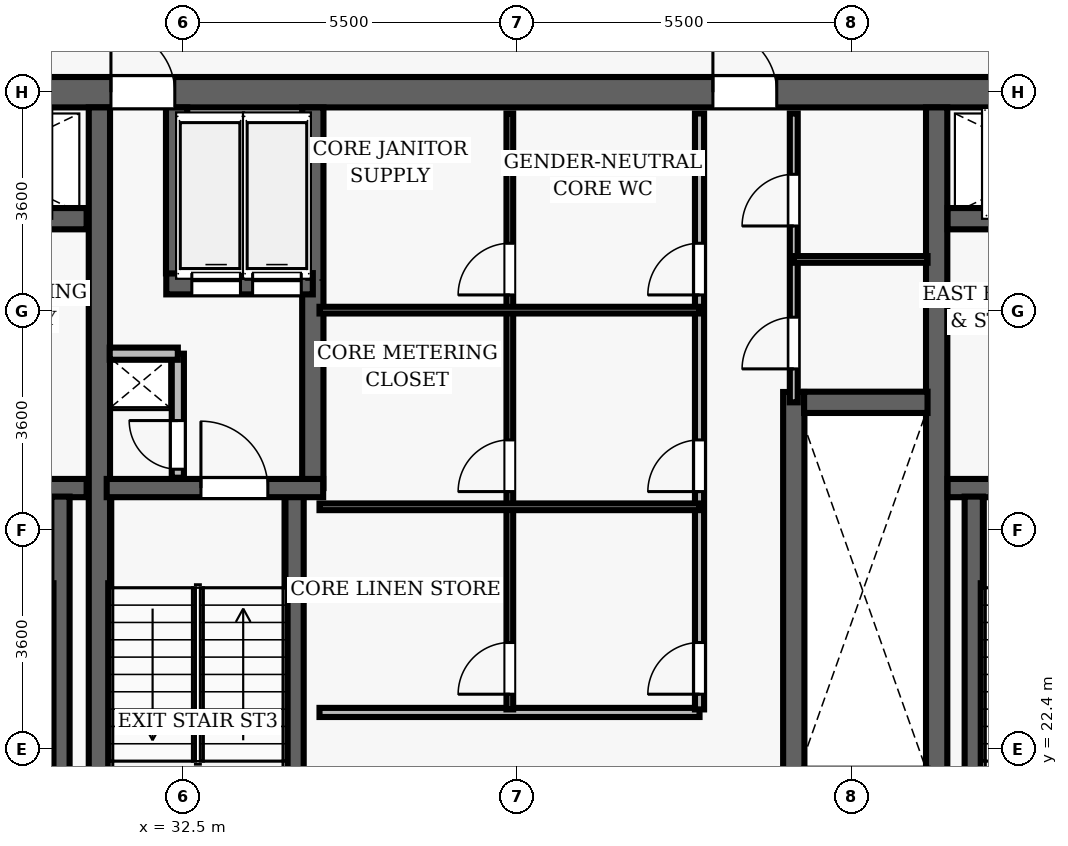
"""IFC4 building model, lengths in metres.
Left out: names, types, materials, properties, quantities, classifications, styles, units other than length and angle.
Written with IfcOpenShell. Run it as: python <this file> out.ifc"""

import sys

from ifc_helpers import new_model, si_unit, direction, frame, frame_2d, origin, place, context, subcontext, project, spatial, rectangle, extrude, element, fill, save


model = new_model("IFC4")
c1 = context("Model", 3, precision=1e-05, world=origin(), true_north=direction((0.0, 1.0)))
c2 = subcontext(c1, "Body", "Model", "MODEL_VIEW")
j1 = project(units=[si_unit("LENGTHUNIT", "METRE"), si_unit("PLANEANGLEUNIT", "RADIAN")], contexts=[c1])
p1 = place(None, origin())
s1 = spatial("IfcSite", under=j1, at=p1, CompositionType="ELEMENT")
p2 = place(p1, origin())
s2 = spatial("IfcBuilding", under=s1, at=p2, CompositionType="ELEMENT")
p3 = place(p2, frame((0.0, 0.0, 202.0)))
s3 = spatial("IfcBuildingStorey", under=s2, at=p3, CompositionType="ELEMENT", Elevation=202.0)
p4 = place(p3, frame((26.75, 33.2, 0.0), z_axis=(0.0, 0.0, 1.0), x_axis=(1.0, 0.0, 0.0)))
e1 = element("IfcWall", 1, at=p4, inside=s3, PredefinedType="SHEAR", context=c2, shape_type="SweptSolid", body=[
    extrude(rectangle(XDim=22.5, YDim=0.5, at=frame_2d((11.25, 0.0))), origin(), (0.0, 0.0, 1.0), 3.85),
])
p5 = place(p4, frame((4.57, 0.0, 0.0)))
e2 = element("IfcOpeningElement", 2, at=p5, cuts=e1, PredefinedType="OPENING", context=c2, shape_type="SweptSolid", body=[
    extrude(rectangle(XDim=1.05, YDim=2.15, at=frame_2d((0.525, 1.075))), frame((0.0, 0.26, 0.0), z_axis=(0.0, -1.0, 0.0), x_axis=(1.0, 0.0, 0.0)), (0.0, 0.0, 1.0), 0.52),
])
p6 = place(p4, frame((14.47, 0.0, 0.0)))
e3 = element("IfcOpeningElement", 3, at=p6, cuts=e1, PredefinedType="OPENING", context=c2, shape_type="SweptSolid", body=[
    extrude(rectangle(XDim=1.05, YDim=2.15, at=frame_2d((0.525, 1.075))), frame((0.0, 0.26, 0.0), z_axis=(0.0, -1.0, 0.0), x_axis=(1.0, 0.0, 0.0)), (0.0, 0.0, 1.0), 0.52),
])
for number, where, z_axis, x_axis in (
    (4, (31.13, 19.05, 0.0), (0.0, 0.0, 1.0), (0.0, 1.0, 0.0)),
    (5, (44.9, 19.05, 0.0), (0.0, 0.0, 1.0), (0.0, 1.0, 0.0)),
):
    element("IfcWall", number, at=place(p3, frame(where, z_axis=z_axis, x_axis=x_axis)), inside=s3, PredefinedType="SHEAR", context=c2, shape_type="SweptSolid", body=[
        extrude(rectangle(XDim=13.9, YDim=0.35, at=frame_2d((6.95, 0.0))), origin(), (0.0, 0.0, 1.0), 3.85),
    ])
p7 = place(p3, frame((27.25, 26.69, 0.0), z_axis=(0.0, 0.0, 1.0), x_axis=(1.0, 0.0, 0.0)))
e6 = element("IfcWall", 6, at=p7, inside=s3, PredefinedType="SHEAR", context=c2, shape_type="SweptSolid", body=[
    extrude(rectangle(XDim=3.67, YDim=0.3, at=frame_2d((1.835, 0.0))), origin(), (0.0, 0.0, 1.0), 3.85),
])
p8 = place(p7, frame((1.05, 0.0, 0.0)))
e7 = element("IfcOpeningElement", 7, at=p8, cuts=e6, PredefinedType="OPENING", context=c2, shape_type="SweptSolid", body=[
    extrude(rectangle(XDim=1.1, YDim=2.15, at=frame_2d((0.55, 1.075))), frame((0.0, 0.16, 0.0), z_axis=(0.0, -1.0, 0.0), x_axis=(1.0, 0.0, 0.0)), (0.0, 0.0, 1.0), 0.32),
])
p9 = place(p3, frame((30.49, 19.05, 0.0), z_axis=(0.0, 0.0, 1.0), x_axis=(0.0, 1.0, 0.0)))
e8 = element("IfcWall", 8, at=p9, inside=s3, PredefinedType="SHEAR", context=c2, shape_type="SweptSolid", body=[
    extrude(rectangle(XDim=7.5, YDim=0.3, at=frame_2d((3.75, 0.0))), origin(), (0.0, 0.0, 1.0), 3.85),
])
p10 = place(p3, frame((27.25, 31.12, 0.0), z_axis=(0.0, 0.0, 1.0), x_axis=(1.0, 0.0, 0.0)))
e9 = element("IfcWall", 9, at=p10, inside=s3, PredefinedType="SHEAR", context=c2, shape_type="SweptSolid", body=[
    extrude(rectangle(XDim=3.67, YDim=0.35, at=frame_2d((1.835, 0.0))), origin(), (0.0, 0.0, 1.0), 3.035),
])
p11 = place(p10, frame((1.25, 0.0, 0.0)))
e10 = element("IfcOpeningElement", 10, at=p11, cuts=e9, PredefinedType="OPENING", context=c2, shape_type="SweptSolid", body=[
    extrude(rectangle(XDim=1.1, YDim=2.15, at=frame_2d((0.55, 1.075))), frame((0.0, 0.185, 0.0), z_axis=(0.0, -1.0, 0.0), x_axis=(1.0, 0.0, 0.0)), (0.0, 0.0, 1.0), 0.37),
])
p12 = place(p3, frame((45.08, 26.69, 0.0), z_axis=(0.0, 0.0, 1.0), x_axis=(1.0, 0.0, 0.0)))
e11 = element("IfcWall", 11, at=p12, inside=s3, PredefinedType="SHEAR", context=c2, shape_type="SweptSolid", body=[
    extrude(rectangle(XDim=3.67, YDim=0.3, at=frame_2d((1.835, 0.0))), origin(), (0.0, 0.0, 1.0), 3.85),
])
p13 = place(p12, frame((1.05, 0.0, 0.0)))
e12 = element("IfcOpeningElement", 12, at=p13, cuts=e11, PredefinedType="OPENING", context=c2, shape_type="SweptSolid", body=[
    extrude(rectangle(XDim=1.1, YDim=2.15, at=frame_2d((0.55, 1.075))), frame((0.0, 0.16, 0.0), z_axis=(0.0, -1.0, 0.0), x_axis=(1.0, 0.0, 0.0)), (0.0, 0.0, 1.0), 0.32),
])
p14 = place(p3, frame((45.51, 19.05, 0.0), z_axis=(0.0, 0.0, 1.0), x_axis=(0.0, 1.0, 0.0)))
e13 = element("IfcWall", 13, at=p14, inside=s3, PredefinedType="SHEAR", context=c2, shape_type="SweptSolid", body=[
    extrude(rectangle(XDim=7.5, YDim=0.3, at=frame_2d((3.75, 0.0))), origin(), (0.0, 0.0, 1.0), 3.85),
])
p15 = place(p3, frame((45.08, 31.12, 0.0), z_axis=(0.0, 0.0, 1.0), x_axis=(1.0, 0.0, 0.0)))
e14 = element("IfcWall", 14, at=p15, inside=s3, PredefinedType="SHEAR", context=c2, shape_type="SweptSolid", body=[
    extrude(rectangle(XDim=3.67, YDim=0.35, at=frame_2d((1.835, 0.0))), origin(), (0.0, 0.0, 1.0), 3.035),
])
p16 = place(p15, frame((1.25, 0.0, 0.0)))
e15 = element("IfcOpeningElement", 15, at=p16, cuts=e14, PredefinedType="OPENING", context=c2, shape_type="SweptSolid", body=[
    extrude(rectangle(XDim=1.1, YDim=2.15, at=frame_2d((0.55, 1.075))), frame((0.0, 0.185, 0.0), z_axis=(0.0, -1.0, 0.0), x_axis=(1.0, 0.0, 0.0)), (0.0, 0.0, 1.0), 0.37),
])
p17 = place(p3, frame((34.34, 19.05, 0.0), z_axis=(0.0, 0.0, 1.0), x_axis=(0.0, 1.0, 0.0)))
e16 = element("IfcWall", 16, at=p17, inside=s3, PredefinedType="SHEAR", context=c2, shape_type="SweptSolid", body=[
    extrude(rectangle(XDim=7.5, YDim=0.3, at=frame_2d((3.75, 0.0))), origin(), (0.0, 0.0, 1.0), 3.85),
])
p18 = place(p3, frame((34.64, 26.69, 0.0), z_axis=(0.0, 0.0, 1.0), x_axis=(0.0, 1.0, 0.0)))
e17 = element("IfcWall", 17, at=p18, inside=s3, PredefinedType="SHEAR", context=c2, shape_type="SweptSolid", body=[
    extrude(rectangle(XDim=6.26, YDim=0.35, at=frame_2d((3.13, 0.0))), origin(), (0.0, 0.0, 1.0), 3.85),
])
p19 = place(p3, frame((31.25, 26.69, 0.0), z_axis=(0.0, 0.0, 1.0), x_axis=(1.0, 0.0, 0.0)))
e18 = element("IfcWall", 18, at=p19, inside=s3, PredefinedType="SHEAR", context=c2, shape_type="SweptSolid", body=[
    extrude(rectangle(XDim=3.56, YDim=0.3, at=frame_2d((1.78, 0.0))), origin(), (0.0, 0.0, 1.0), 3.85),
])
p20 = place(p19, frame((1.55, 0.0, 0.0)))
e19 = element("IfcOpeningElement", 19, at=p20, cuts=e18, PredefinedType="OPENING", context=c2, shape_type="SweptSolid", body=[
    extrude(rectangle(XDim=1.1, YDim=2.15, at=frame_2d((0.55, 1.075))), frame((0.0, 0.16, 0.0), z_axis=(0.0, -1.0, 0.0), x_axis=(1.0, 0.0, 0.0)), (0.0, 0.0, 1.0), 0.32),
])
p21 = place(p3, frame((32.23, 30.05, 0.0), z_axis=(0.0, 0.0, 1.0), x_axis=(1.0, 0.0, 0.0)))
e20 = element("IfcWall", 20, at=p21, inside=s3, PredefinedType="SHEAR", context=c2, shape_type="SweptSolid", body=[
    extrude(rectangle(XDim=2.41, YDim=0.35, at=frame_2d((1.205, 0.0))), origin(), (0.0, 0.0, 1.0), 3.035),
])
p22 = place(p21, frame((0.42, 0.0, 0.0)))
e21 = element("IfcOpeningElement", 21, at=p22, cuts=e20, PredefinedType="OPENING", context=c2, shape_type="SweptSolid", body=[
    extrude(rectangle(XDim=0.8, YDim=2.15, at=frame_2d((0.4, 1.075))), frame((0.0, 0.185, 0.0), z_axis=(0.0, -1.0, 0.0), x_axis=(1.0, 0.0, 0.0)), (0.0, 0.0, 1.0), 0.37),
])
p23 = place(p21, frame((1.42, 0.0, 0.0)))
e22 = element("IfcOpeningElement", 22, at=p23, cuts=e20, PredefinedType="OPENING", context=c2, shape_type="SweptSolid", body=[
    extrude(rectangle(XDim=0.8, YDim=2.15, at=frame_2d((0.4, 1.075))), frame((0.0, 0.185, 0.0), z_axis=(0.0, -1.0, 0.0), x_axis=(1.0, 0.0, 0.0)), (0.0, 0.0, 1.0), 0.37),
])
p24 = place(p3, frame((32.4, 30.22, 0.0), z_axis=(0.0, 0.0, 1.0), x_axis=(0.0, 1.0, 0.0)))
e23 = element("IfcWall", 23, at=p24, inside=s3, PredefinedType="SHEAR", context=c2, shape_type="SweptSolid", body=[
    extrude(rectangle(XDim=2.73, YDim=0.35, at=frame_2d((1.365, 0.0))), origin(), (0.0, 0.0, 1.0), 3.035),
])
p25 = place(p3, frame((32.42, 26.86, 0.0), z_axis=(0.0, 0.0, 1.0), x_axis=(0.0, 1.0, 0.0)))
e24 = element("IfcWall", 24, at=p25, inside=s3, PredefinedType="PARTITIONING", context=c2, shape_type="SweptSolid", body=[
    extrude(rectangle(XDim=2.04, YDim=0.2, at=frame_2d((1.02, 0.0))), origin(), (0.0, 0.0, 1.0), 3.035),
])
p26 = place(p25, frame((0.14, 0.0, 0.0)))
e25 = element("IfcOpeningElement", 25, at=p26, cuts=e24, PredefinedType="OPENING", context=c2, shape_type="SweptSolid", body=[
    extrude(rectangle(XDim=0.8, YDim=2.05, at=frame_2d((0.4, 1.025))), frame((0.0, 0.11, 0.0), z_axis=(0.0, -1.0, 0.0), x_axis=(1.0, 0.0, 0.0)), (0.0, 0.0, 1.0), 0.22),
])
p27 = place(p3, frame((31.3, 28.9, 0.0), z_axis=(0.0, 0.0, 1.0), x_axis=(1.0, 0.0, 0.0)))
e26 = element("IfcWall", 26, at=p27, inside=s3, PredefinedType="PARTITIONING", context=c2, shape_type="SweptSolid", body=[
    extrude(rectangle(XDim=1.12, YDim=0.2, at=frame_2d((0.56, 0.0))), origin(), (0.0, 0.0, 1.0), 3.035),
])
p28 = place(p3, frame((42.55, 21.73, 0.0), z_axis=(0.0, 0.0, 1.0), x_axis=(0.0, 1.0, 0.0)))
e27 = element("IfcWall", 27, at=p28, inside=s3, PredefinedType="SHEAR", context=c2, shape_type="SweptSolid", body=[
    extrude(rectangle(XDim=6.54, YDim=0.35, at=frame_2d((3.27, 0.0))), origin(), (0.0, 0.0, 1.0), 3.035),
])
p29 = place(p3, frame((42.72, 28.1, 0.0), z_axis=(0.0, 0.0, 1.0), x_axis=(1.0, 0.0, 0.0)))
e28 = element("IfcWall", 28, at=p29, inside=s3, PredefinedType="SHEAR", context=c2, shape_type="SweptSolid", body=[
    extrude(rectangle(XDim=2.03, YDim=0.35, at=frame_2d((1.015, 0.0))), origin(), (0.0, 0.0, 1.0), 3.035),
])
p30 = place(p3, frame((34.75, 23.0, 0.0), z_axis=(0.0, 0.0, 1.0), x_axis=(1.0, 0.0, 0.0)))
e29 = element("IfcWall", 29, at=p30, inside=s3, PredefinedType="PARTITIONING", context=c2, shape_type="SweptSolid", body=[
    extrude(rectangle(XDim=6.25, YDim=0.15, at=frame_2d((3.125, 0.0))), origin(), (0.0, 0.0, 1.0), 3.035),
])
p31 = place(p3, frame((41.0, 23.05, 0.0), z_axis=(0.0, 0.0, 1.0), x_axis=(0.0, 1.0, 0.0)))
e30 = element("IfcWall", 30, at=p31, inside=s3, PredefinedType="PARTITIONING", context=c2, shape_type="SweptSolid", body=[
    extrude(rectangle(XDim=9.8, YDim=0.15, at=frame_2d((4.9, 0.0))), origin(), (0.0, 0.0, 1.0), 3.035),
])
p32 = place(p31, frame((0.25, 0.0, 0.0)))
e31 = element("IfcOpeningElement", 31, at=p32, cuts=e30, PredefinedType="OPENING", context=c2, shape_type="SweptSolid", body=[
    extrude(rectangle(XDim=0.85, YDim=2.1, at=frame_2d((0.425, 1.05))), frame((0.0, 0.085, 0.0), z_axis=(0.0, -1.0, 0.0), x_axis=(1.0, 0.0, 0.0)), (0.0, 0.0, 1.0), 0.17),
])
p33 = place(p31, frame((3.582, 0.0, 0.0)))
e32 = element("IfcOpeningElement", 32, at=p33, cuts=e30, PredefinedType="OPENING", context=c2, shape_type="SweptSolid", body=[
    extrude(rectangle(XDim=0.85, YDim=2.1, at=frame_2d((0.425, 1.05))), frame((0.0, 0.085, 0.0), z_axis=(0.0, -1.0, 0.0), x_axis=(1.0, 0.0, 0.0)), (0.0, 0.0, 1.0), 0.17),
])
p34 = place(p31, frame((6.816, 0.0, 0.0)))
e33 = element("IfcOpeningElement", 33, at=p34, cuts=e30, PredefinedType="OPENING", context=c2, shape_type="SweptSolid", body=[
    extrude(rectangle(XDim=0.85, YDim=2.1, at=frame_2d((0.425, 1.05))), frame((0.0, 0.085, 0.0), z_axis=(0.0, -1.0, 0.0), x_axis=(1.0, 0.0, 0.0)), (0.0, 0.0, 1.0), 0.17),
])
p35 = place(p3, frame((37.88, 23.05, 0.0), z_axis=(0.0, 0.0, 1.0), x_axis=(0.0, 1.0, 0.0)))
e34 = element("IfcWall", 34, at=p35, inside=s3, PredefinedType="PARTITIONING", context=c2, shape_type="SweptSolid", body=[
    extrude(rectangle(XDim=9.8, YDim=0.11, at=frame_2d((4.9, 0.0))), origin(), (0.0, 0.0, 1.0), 3.035),
])
p36 = place(p35, frame((0.25, 0.0, 0.0)))
e35 = element("IfcOpeningElement", 35, at=p36, cuts=e34, PredefinedType="OPENING", context=c2, shape_type="SweptSolid", body=[
    extrude(rectangle(XDim=0.85, YDim=2.1, at=frame_2d((0.425, 1.05))), frame((0.0, 0.065, 0.0), z_axis=(0.0, -1.0, 0.0), x_axis=(1.0, 0.0, 0.0)), (0.0, 0.0, 1.0), 0.13),
])
p37 = place(p35, frame((3.582, 0.0, 0.0)))
e36 = element("IfcOpeningElement", 36, at=p37, cuts=e34, PredefinedType="OPENING", context=c2, shape_type="SweptSolid", body=[
    extrude(rectangle(XDim=0.85, YDim=2.1, at=frame_2d((0.425, 1.05))), frame((0.0, 0.065, 0.0), z_axis=(0.0, -1.0, 0.0), x_axis=(1.0, 0.0, 0.0)), (0.0, 0.0, 1.0), 0.13),
])
p38 = place(p35, frame((6.816, 0.0, 0.0)))
e37 = element("IfcOpeningElement", 37, at=p38, cuts=e34, PredefinedType="OPENING", context=c2, shape_type="SweptSolid", body=[
    extrude(rectangle(XDim=0.85, YDim=2.1, at=frame_2d((0.425, 1.05))), frame((0.0, 0.065, 0.0), z_axis=(0.0, -1.0, 0.0), x_axis=(1.0, 0.0, 0.0)), (0.0, 0.0, 1.0), 0.13),
])
for number, where, z_axis, x_axis in (
    (38, (34.75, 26.382, 0.0), (0.0, 0.0, 1.0), (1.0, 0.0, 0.0)),
    (39, (34.75, 29.616, 0.0), (0.0, 0.0, 1.0), (1.0, 0.0, 0.0)),
):
    element("IfcWall", number, at=place(p3, frame(where, z_axis=z_axis, x_axis=x_axis)), inside=s3, PredefinedType="PARTITIONING", context=c2, shape_type="SweptSolid", body=[
        extrude(rectangle(XDim=6.25, YDim=0.11, at=frame_2d((3.125, 0.0))), origin(), (0.0, 0.0, 1.0), 3.035),
    ])
p39 = place(p3, frame((42.55, 28.1, 0.0), z_axis=(0.0, 0.0, 1.0), x_axis=(0.0, 1.0, 0.0)))
e40 = element("IfcWall", 40, at=p39, inside=s3, PredefinedType="PARTITIONING", context=c2, shape_type="SweptSolid", body=[
    extrude(rectangle(XDim=4.75, YDim=0.13, at=frame_2d((2.375, 0.0))), origin(), (0.0, 0.0, 1.0), 3.035),
])
p40 = place(p39, frame((0.55, 0.0, 0.0)))
e41 = element("IfcOpeningElement", 41, at=p40, cuts=e40, PredefinedType="OPENING", context=c2, shape_type="SweptSolid", body=[
    extrude(rectangle(XDim=0.85, YDim=2.1, at=frame_2d((0.425, 1.05))), frame((0.0, 0.075, 0.0), z_axis=(0.0, -1.0, 0.0), x_axis=(1.0, 0.0, 0.0)), (0.0, 0.0, 1.0), 0.15),
])
p41 = place(p39, frame((2.9, 0.0, 0.0)))
e42 = element("IfcOpeningElement", 42, at=p41, cuts=e40, PredefinedType="OPENING", context=c2, shape_type="SweptSolid", body=[
    extrude(rectangle(XDim=0.85, YDim=2.1, at=frame_2d((0.425, 1.05))), frame((0.0, 0.075, 0.0), z_axis=(0.0, -1.0, 0.0), x_axis=(1.0, 0.0, 0.0)), (0.0, 0.0, 1.0), 0.15),
])
p42 = place(p3, frame((42.55, 30.45, 0.0), z_axis=(0.0, 0.0, 1.0), x_axis=(1.0, 0.0, 0.0)))
e43 = element("IfcWall", 43, at=p42, inside=s3, PredefinedType="PARTITIONING", context=c2, shape_type="SweptSolid", body=[
    extrude(rectangle(XDim=2.2, YDim=0.11, at=frame_2d((1.1, 0.0))), origin(), (0.0, 0.0, 1.0), 3.035),
])
p43 = place(p20, origin())
e44 = element("IfcDoor", 44, at=p43, inside=s3, OperationType="SINGLE_SWING_LEFT", PredefinedType="DOOR", context=c2, shape_type="SweptSolid", body=[
    extrude(rectangle(XDim=1.1, YDim=2.15, at=frame_2d((0.55, 1.075))), frame((0.0, 0.025, 0.0), z_axis=(0.0, -1.0, 0.0), x_axis=(1.0, 0.0, 0.0)), (0.0, 0.0, 1.0), 0.05),
])
fill(e19, e44)
p44 = place(p26, origin())
e45 = element("IfcDoor", 45, at=p44, inside=s3, OperationType="SINGLE_SWING_RIGHT", PredefinedType="DOOR", context=c2, shape_type="SweptSolid", body=[
    extrude(rectangle(XDim=0.8, YDim=2.05, at=frame_2d((0.4, 1.025))), frame((0.0, 0.025, 0.0), z_axis=(0.0, -1.0, 0.0), x_axis=(1.0, 0.0, 0.0)), (0.0, 0.0, 1.0), 0.05),
])
fill(e25, e45)
p45 = place(p5, origin())
e46 = element("IfcDoor", 46, at=p45, inside=s3, OperationType="SINGLE_SWING_LEFT", PredefinedType="DOOR", context=c2, shape_type="SweptSolid", body=[
    extrude(rectangle(XDim=1.05, YDim=2.15, at=frame_2d((0.525, 1.075))), frame((0.0, 0.025, 0.0), z_axis=(0.0, -1.0, 0.0), x_axis=(1.0, 0.0, 0.0)), (0.0, 0.0, 1.0), 0.05),
])
fill(e2, e46)
p46 = place(p6, origin())
e47 = element("IfcDoor", 47, at=p46, inside=s3, OperationType="SINGLE_SWING_LEFT", PredefinedType="DOOR", context=c2, shape_type="SweptSolid", body=[
    extrude(rectangle(XDim=1.05, YDim=2.15, at=frame_2d((0.525, 1.075))), frame((0.0, 0.025, 0.0), z_axis=(0.0, -1.0, 0.0), x_axis=(1.0, 0.0, 0.0)), (0.0, 0.0, 1.0), 0.05),
])
fill(e3, e47)
p47 = place(p32, origin())
e48 = element("IfcDoor", 48, at=p47, inside=s3, OperationType="SINGLE_SWING_LEFT", PredefinedType="DOOR", context=c2, shape_type="SweptSolid", body=[
    extrude(rectangle(XDim=0.85, YDim=2.1, at=frame_2d((0.425, 1.05))), frame((0.0, 0.025, 0.0), z_axis=(0.0, -1.0, 0.0), x_axis=(1.0, 0.0, 0.0)), (0.0, 0.0, 1.0), 0.05),
])
fill(e31, e48)
p48 = place(p36, origin())
e49 = element("IfcDoor", 49, at=p48, inside=s3, OperationType="SINGLE_SWING_LEFT", PredefinedType="DOOR", context=c2, shape_type="SweptSolid", body=[
    extrude(rectangle(XDim=0.85, YDim=2.1, at=frame_2d((0.425, 1.05))), frame((0.0, 0.025, 0.0), z_axis=(0.0, -1.0, 0.0), x_axis=(1.0, 0.0, 0.0)), (0.0, 0.0, 1.0), 0.05),
])
fill(e35, e49)
p49 = place(p33, origin())
e50 = element("IfcDoor", 50, at=p49, inside=s3, OperationType="SINGLE_SWING_LEFT", PredefinedType="DOOR", context=c2, shape_type="SweptSolid", body=[
    extrude(rectangle(XDim=0.85, YDim=2.1, at=frame_2d((0.425, 1.05))), frame((0.0, 0.025, 0.0), z_axis=(0.0, -1.0, 0.0), x_axis=(1.0, 0.0, 0.0)), (0.0, 0.0, 1.0), 0.05),
])
fill(e32, e50)
p50 = place(p37, origin())
e51 = element("IfcDoor", 51, at=p50, inside=s3, OperationType="SINGLE_SWING_LEFT", PredefinedType="DOOR", context=c2, shape_type="SweptSolid", body=[
    extrude(rectangle(XDim=0.85, YDim=2.1, at=frame_2d((0.425, 1.05))), frame((0.0, 0.025, 0.0), z_axis=(0.0, -1.0, 0.0), x_axis=(1.0, 0.0, 0.0)), (0.0, 0.0, 1.0), 0.05),
])
fill(e36, e51)
p51 = place(p34, origin())
e52 = element("IfcDoor", 52, at=p51, inside=s3, OperationType="SINGLE_SWING_LEFT", PredefinedType="DOOR", context=c2, shape_type="SweptSolid", body=[
    extrude(rectangle(XDim=0.85, YDim=2.1, at=frame_2d((0.425, 1.05))), frame((0.0, 0.025, 0.0), z_axis=(0.0, -1.0, 0.0), x_axis=(1.0, 0.0, 0.0)), (0.0, 0.0, 1.0), 0.05),
])
fill(e33, e52)
p52 = place(p38, origin())
e53 = element("IfcDoor", 53, at=p52, inside=s3, OperationType="SINGLE_SWING_LEFT", PredefinedType="DOOR", context=c2, shape_type="SweptSolid", body=[
    extrude(rectangle(XDim=0.85, YDim=2.1, at=frame_2d((0.425, 1.05))), frame((0.0, 0.025, 0.0), z_axis=(0.0, -1.0, 0.0), x_axis=(1.0, 0.0, 0.0)), (0.0, 0.0, 1.0), 0.05),
])
fill(e37, e53)
p53 = place(p40, origin())
e54 = element("IfcDoor", 54, at=p53, inside=s3, OperationType="SINGLE_SWING_LEFT", PredefinedType="DOOR", context=c2, shape_type="SweptSolid", body=[
    extrude(rectangle(XDim=0.85, YDim=2.1, at=frame_2d((0.425, 1.05))), frame((0.0, 0.025, 0.0), z_axis=(0.0, -1.0, 0.0), x_axis=(1.0, 0.0, 0.0)), (0.0, 0.0, 1.0), 0.05),
])
fill(e41, e54)
p54 = place(p41, origin())
e55 = element("IfcDoor", 55, at=p54, inside=s3, OperationType="SINGLE_SWING_LEFT", PredefinedType="DOOR", context=c2, shape_type="SweptSolid", body=[
    extrude(rectangle(XDim=0.85, YDim=2.1, at=frame_2d((0.425, 1.05))), frame((0.0, 0.025, 0.0), z_axis=(0.0, -1.0, 0.0), x_axis=(1.0, 0.0, 0.0)), (0.0, 0.0, 1.0), 0.05),
])
fill(e42, e55)
p55 = place(p22, origin())
e56 = element("IfcDoor", 56, at=p55, inside=s3, OperationType="SLIDING_TO_LEFT", PredefinedType="DOOR", context=c2, shape_type="SweptSolid", body=[
    extrude(rectangle(XDim=0.8, YDim=2.15, at=frame_2d((0.4, 1.075))), frame((0.0, 0.025, 0.0), z_axis=(0.0, -1.0, 0.0), x_axis=(1.0, 0.0, 0.0)), (0.0, 0.0, 1.0), 0.05),
])
fill(e21, e56)
p56 = place(p23, origin())
e57 = element("IfcDoor", 57, at=p56, inside=s3, OperationType="SLIDING_TO_LEFT", PredefinedType="DOOR", context=c2, shape_type="SweptSolid", body=[
    extrude(rectangle(XDim=0.8, YDim=2.15, at=frame_2d((0.4, 1.075))), frame((0.0, 0.025, 0.0), z_axis=(0.0, -1.0, 0.0), x_axis=(1.0, 0.0, 0.0)), (0.0, 0.0, 1.0), 0.05),
])
fill(e22, e57)
save(model, sys.argv[1])
